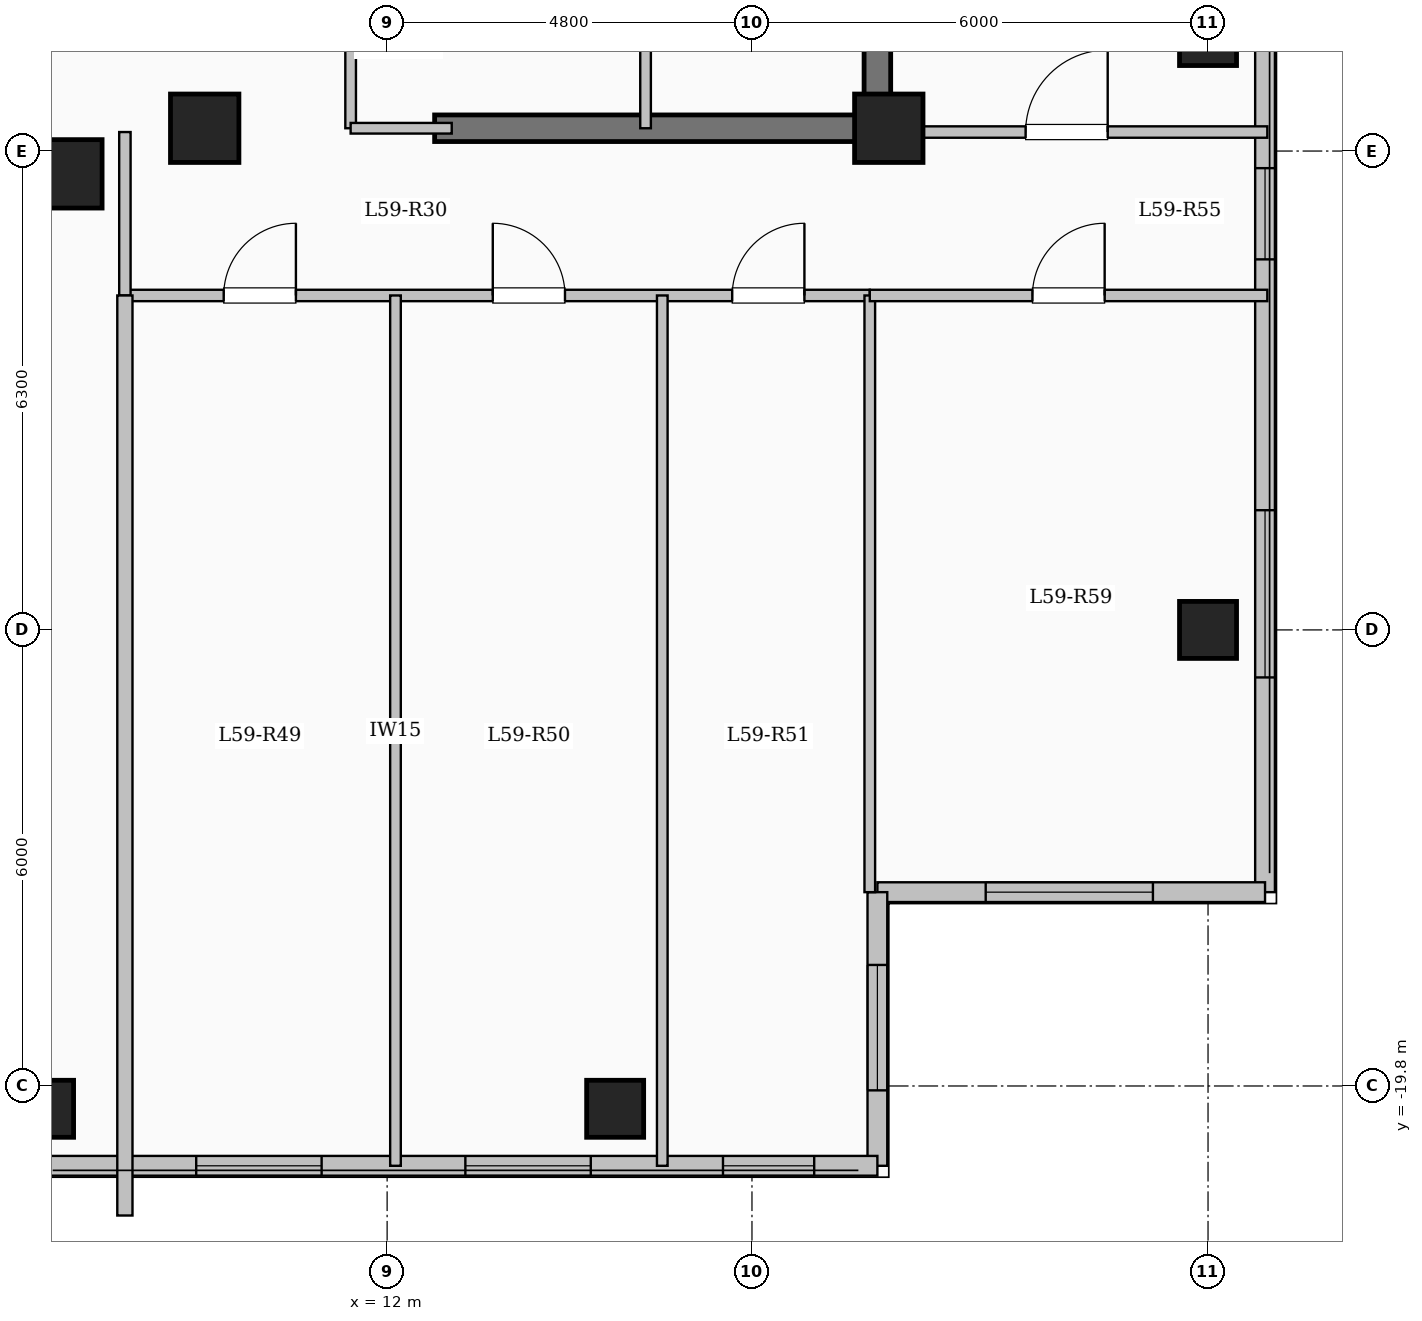
"""IFC4 building model, lengths in metres.
Left out: names, types, materials, properties, quantities, classifications, styles, units other than length and angle.
Written with IfcOpenShell. Run it as: python <this file> out.ifc"""

import sys

from ifc_helpers import new_model, si_unit, direction, frame, frame_2d, origin, origin_2d, place, context, subcontext, project, spatial, rectangle, extrude, element, fill, save


model = new_model("IFC4")
c1 = context("Model", 3, precision=1e-05, world=origin(), true_north=direction((0.0, 1.0)))
c2 = subcontext(c1, "Body", "Model", "MODEL_VIEW")
j1 = project(units=[si_unit("LENGTHUNIT", "METRE"), si_unit("PLANEANGLEUNIT", "RADIAN")], contexts=[c1])
p1 = place(None, origin())
s1 = spatial("IfcSite", under=j1, at=p1, CompositionType="ELEMENT")
p2 = place(p1, origin())
s2 = spatial("IfcBuilding", under=s1, at=p2, CompositionType="ELEMENT")
p3 = place(p2, frame((0.0, 0.0, 217.05)))
s3 = spatial("IfcBuildingStorey", under=s2, at=p3, CompositionType="ELEMENT", Elevation=217.05)
for number, where, z_axis, x_axis in (
    (1, (7.8, -7.8, 0.0), (0.0, 0.0, 1.0), (1.0, 0.0, 0.0)),
    (2, (9.6, -7.2, 0.0), (0.0, 0.0, 1.0), (1.0, 0.0, 0.0)),
    (3, (18.6, -7.2, 0.0), (0.0, 0.0, 1.0), (1.0, 0.0, 0.0)),
):
    element("IfcColumn", number, at=place(p3, frame(where, z_axis=z_axis, x_axis=x_axis)), inside=s3, PredefinedType="COLUMN", context=c2, shape_type="SweptSolid", body=[
        extrude(rectangle(XDim=0.9, YDim=0.9, at=origin_2d()), origin(), (0.0, 0.0, 1.0), 3.35),
    ])
for number, where, z_axis, x_axis in (
    (4, (7.5, -20.1, 0.0), (0.0, 0.0, 1.0), (1.0, 0.0, 0.0)),
    (5, (15.0, -20.1, 0.0), (0.0, 0.0, 1.0), (1.0, 0.0, 0.0)),
    (6, (22.8, -13.8, 0.0), (0.0, 0.0, 1.0), (1.0, 0.0, 0.0)),
    (7, (22.8, -6.0, 0.0), (0.0, 0.0, 1.0), (1.0, 0.0, 0.0)),
):
    element("IfcColumn", number, at=place(p3, frame(where, z_axis=z_axis, x_axis=x_axis)), inside=s3, PredefinedType="COLUMN", context=c2, shape_type="SweptSolid", body=[
        extrude(rectangle(XDim=0.75, YDim=0.75, at=origin_2d()), origin(), (0.0, 0.0, 1.0), 3.35),
    ])
p4 = place(p3, frame((23.55, 17.25, 0.0), z_axis=(0.0, 0.0, 1.0), x_axis=(0.0, -1.0, 0.0)))
e8 = element("IfcWall", 8, at=p4, inside=s3, PredefinedType="SOLIDWALL", context=c2, shape_type="SweptSolid", body=[
    extrude(rectangle(XDim=34.5, YDim=0.26, at=frame_2d((17.25, 0.0))), origin(), (0.0, 0.0, 1.0), 3.1),
])
p5 = place(p4, frame((1.375, 0.0, 0.9)))
e9 = element("IfcOpeningElement", 9, at=p5, cuts=e8, PredefinedType="OPENING", context=c2, shape_type="SweptSolid", body=[
    extrude(rectangle(XDim=2.0, YDim=1.7, at=frame_2d((1.0, 0.85))), frame((0.0, 0.14, 0.0), z_axis=(0.0, -1.0, 0.0), x_axis=(1.0, 0.0, 0.0)), (0.0, 0.0, 1.0), 0.28),
])
p6 = place(p4, frame((5.125, 0.0, 0.95)))
e10 = element("IfcOpeningElement", 10, at=p6, cuts=e8, PredefinedType="OPENING", context=c2, shape_type="SweptSolid", body=[
    extrude(rectangle(XDim=1.0, YDim=1.5, at=frame_2d((0.5, 0.75))), frame((0.0, 0.14, 0.0), z_axis=(0.0, -1.0, 0.0), x_axis=(1.0, 0.0, 0.0)), (0.0, 0.0, 1.0), 0.28),
])
p7 = place(p4, frame((14.5, 0.0, 0.9)))
e11 = element("IfcOpeningElement", 11, at=p7, cuts=e8, PredefinedType="OPENING", context=c2, shape_type="SweptSolid", body=[
    extrude(rectangle(XDim=2.0, YDim=1.7, at=frame_2d((1.0, 0.85))), frame((0.0, 0.14, 0.0), z_axis=(0.0, -1.0, 0.0), x_axis=(1.0, 0.0, 0.0)), (0.0, 0.0, 1.0), 0.28),
])
p8 = place(p4, frame((24.975, 0.0, 0.95)))
e12 = element("IfcOpeningElement", 12, at=p8, cuts=e8, PredefinedType="OPENING", context=c2, shape_type="SweptSolid", body=[
    extrude(rectangle(XDim=1.2, YDim=1.5, at=frame_2d((0.6, 0.75))), frame((0.0, 0.14, 0.0), z_axis=(0.0, -1.0, 0.0), x_axis=(1.0, 0.0, 0.0)), (0.0, 0.0, 1.0), 0.28),
])
p9 = place(p4, frame((29.475, 0.0, 0.9)))
e13 = element("IfcOpeningElement", 13, at=p9, cuts=e8, PredefinedType="OPENING", context=c2, shape_type="SweptSolid", body=[
    extrude(rectangle(XDim=2.2, YDim=1.75, at=frame_2d((1.1, 0.875))), frame((0.0, 0.14, 0.0), z_axis=(0.0, -1.0, 0.0), x_axis=(1.0, 0.0, 0.0)), (0.0, 0.0, 1.0), 0.28),
])
p10 = place(p3, frame((23.55, -17.25, 0.0), z_axis=(0.0, 0.0, 1.0), x_axis=(-1.0, 0.0, 0.0)))
e14 = element("IfcWall", 14, at=p10, inside=s3, PredefinedType="SOLIDWALL", context=c2, shape_type="SweptSolid", body=[
    extrude(rectangle(XDim=5.1, YDim=0.26, at=frame_2d((2.55, 0.0))), origin(), (0.0, 0.0, 1.0), 3.1),
])
p11 = place(p10, frame((1.475, 0.0, 0.9)))
e15 = element("IfcOpeningElement", 15, at=p11, cuts=e14, PredefinedType="OPENING", context=c2, shape_type="SweptSolid", body=[
    extrude(rectangle(XDim=2.2, YDim=1.75, at=frame_2d((1.1, 0.875))), frame((0.0, 0.14, 0.0), z_axis=(0.0, -1.0, 0.0), x_axis=(1.0, 0.0, 0.0)), (0.0, 0.0, 1.0), 0.28),
])
p12 = place(p3, frame((18.45, -17.25, 0.0), z_axis=(0.0, 0.0, 1.0), x_axis=(0.0, -1.0, 0.0)))
e16 = element("IfcWall", 16, at=p12, inside=s3, PredefinedType="SOLIDWALL", context=c2, shape_type="SweptSolid", body=[
    extrude(rectangle(XDim=3.6, YDim=0.26, at=frame_2d((1.8, 0.0))), origin(), (0.0, 0.0, 1.0), 3.1),
])
p13 = place(p12, frame((0.958, 0.0, 0.9)))
e17 = element("IfcOpeningElement", 17, at=p13, cuts=e16, PredefinedType="OPENING", context=c2, shape_type="SweptSolid", body=[
    extrude(rectangle(XDim=1.65, YDim=1.6, at=frame_2d((0.825, 0.8))), frame((0.0, 0.14, 0.0), z_axis=(0.0, -1.0, 0.0), x_axis=(1.0, 0.0, 0.0)), (0.0, 0.0, 1.0), 0.28),
])
p14 = place(p3, frame((18.45, -20.85, 0.0), z_axis=(0.0, 0.0, 1.0), x_axis=(-1.0, 0.0, 0.0)))
e18 = element("IfcWall", 18, at=p14, inside=s3, PredefinedType="SOLIDWALL", context=c2, shape_type="SweptSolid", body=[
    extrude(rectangle(XDim=11.1, YDim=0.26, at=frame_2d((5.55, 0.0))), origin(), (0.0, 0.0, 1.0), 3.1),
])
p15 = place(p14, frame((0.831, 0.0, 0.95)))
e19 = element("IfcOpeningElement", 19, at=p15, cuts=e18, PredefinedType="OPENING", context=c2, shape_type="SweptSolid", body=[
    extrude(rectangle(XDim=1.2, YDim=1.5, at=frame_2d((0.6, 0.75))), frame((0.0, 0.14, 0.0), z_axis=(0.0, -1.0, 0.0), x_axis=(1.0, 0.0, 0.0)), (0.0, 0.0, 1.0), 0.28),
])
p16 = place(p14, frame((3.771, 0.0, 0.9)))
e20 = element("IfcOpeningElement", 20, at=p16, cuts=e18, PredefinedType="OPENING", context=c2, shape_type="SweptSolid", body=[
    extrude(rectangle(XDim=1.65, YDim=1.6, at=frame_2d((0.825, 0.8))), frame((0.0, 0.14, 0.0), z_axis=(0.0, -1.0, 0.0), x_axis=(1.0, 0.0, 0.0)), (0.0, 0.0, 1.0), 0.28),
])
p17 = place(p14, frame((7.312, 0.0, 0.9)))
e21 = element("IfcOpeningElement", 21, at=p17, cuts=e18, PredefinedType="OPENING", context=c2, shape_type="SweptSolid", body=[
    extrude(rectangle(XDim=1.65, YDim=1.6, at=frame_2d((0.825, 0.8))), frame((0.0, 0.14, 0.0), z_axis=(0.0, -1.0, 0.0), x_axis=(1.0, 0.0, 0.0)), (0.0, 0.0, 1.0), 0.28),
])
p18 = place(p3, frame((18.45, -7.375, 0.0), z_axis=(0.0, 0.0, 1.0), x_axis=(0.0, 1.0, 0.0)))
e22 = element("IfcWall", 22, at=p18, inside=s3, PredefinedType="SHEAR", context=c2, shape_type="SweptSolid", body=[
    extrude(rectangle(XDim=14.05, YDim=0.35, at=frame_2d((7.025, 0.0))), origin(), (0.0, 0.0, 1.0), 3.35),
])
p19 = place(p3, frame((12.625, -7.2, 0.0), z_axis=(0.0, 0.0, 1.0), x_axis=(1.0, 0.0, 0.0)))
e23 = element("IfcWall", 23, at=p19, inside=s3, PredefinedType="SHEAR", context=c2, shape_type="SweptSolid", body=[
    extrude(rectangle(XDim=6.0, YDim=0.35, at=frame_2d((3.0, 0.0))), origin(), (0.0, 0.0, 1.0), 3.35),
])
p20 = place(p3, frame((15.4, -7.2, 0.0), z_axis=(0.0, 0.0, 1.0), x_axis=(0.0, 1.0, 0.0)))
e24 = element("IfcWall", 24, at=p20, inside=s3, PredefinedType="PARTITIONING", context=c2, shape_type="SweptSolid", body=[
    extrude(rectangle(XDim=10.45, YDim=0.14, at=frame_2d((5.225, 0.0))), origin(), (0.0, 0.0, 1.0), 3.1),
])
p21 = place(p20, frame((9.25, 0.0, 0.0)))
e25 = element("IfcOpeningElement", 25, at=p21, cuts=e24, PredefinedType="OPENING", context=c2, shape_type="SweptSolid", body=[
    extrude(rectangle(XDim=0.9, YDim=2.08, at=frame_2d((0.45, 1.04))), frame((0.0, 0.08, 0.0), z_axis=(0.0, -1.0, 0.0), x_axis=(1.0, 0.0, 0.0)), (0.0, 0.0, 1.0), 0.16),
])
p22 = place(p3, frame((11.52, -7.2, 0.0), z_axis=(0.0, 0.0, 1.0), x_axis=(0.0, 1.0, 0.0)))
e26 = element("IfcWall", 26, at=p22, inside=s3, PredefinedType="PARTITIONING", context=c2, shape_type="SweptSolid", body=[
    extrude(rectangle(XDim=9.12, YDim=0.14, at=frame_2d((4.56, 0.0))), origin(), (0.0, 0.0, 1.0), 3.1),
])
p23 = place(p22, frame((1.8, 0.0, 0.0)))
e27 = element("IfcOpeningElement", 27, at=p23, cuts=e26, PredefinedType="OPENING", context=c2, shape_type="SweptSolid", body=[
    extrude(rectangle(XDim=0.9, YDim=2.08, at=frame_2d((0.45, 1.04))), frame((0.0, 0.08, 0.0), z_axis=(0.0, -1.0, 0.0), x_axis=(1.0, 0.0, 0.0)), (0.0, 0.0, 1.0), 0.16),
])
p24 = place(p22, frame((6.2, 0.0, 0.0)))
e28 = element("IfcOpeningElement", 28, at=p24, cuts=e26, PredefinedType="OPENING", context=c2, shape_type="SweptSolid", body=[
    extrude(rectangle(XDim=0.9, YDim=2.08, at=frame_2d((0.45, 1.04))), frame((0.0, 0.08, 0.0), z_axis=(0.0, -1.0, 0.0), x_axis=(1.0, 0.0, 0.0)), (0.0, 0.0, 1.0), 0.16),
])
p25 = place(p3, frame((11.52, -7.2, 0.0), z_axis=(0.0, 0.0, 1.0), x_axis=(1.0, 0.0, 0.0)))
e29 = element("IfcWall", 29, at=p25, inside=s3, PredefinedType="PARTITIONING", context=c2, shape_type="SweptSolid", body=[
    extrude(rectangle(XDim=1.33, YDim=0.14, at=frame_2d((0.665, 0.0))), origin(), (0.0, 0.0, 1.0), 2.235),
])
p26 = place(p3, frame((8.55, -9.4, 0.0), z_axis=(0.0, 0.0, 1.0), x_axis=(1.0, 0.0, 0.0)))
e30 = element("IfcWall", 30, at=p26, inside=s3, PredefinedType="PARTITIONING", context=c2, shape_type="SweptSolid", body=[
    extrude(rectangle(XDim=9.8, YDim=0.15, at=frame_2d((4.9, 0.0))), origin(), (0.0, 0.0, 1.0), 3.1),
])
p27 = place(p26, frame((1.3, 0.0, 0.0)))
e31 = element("IfcOpeningElement", 31, at=p27, cuts=e30, PredefinedType="OPENING", context=c2, shape_type="SweptSolid", body=[
    extrude(rectangle(XDim=0.95, YDim=2.15, at=frame_2d((0.475, 1.075))), frame((0.0, 0.085, 0.0), z_axis=(0.0, -1.0, 0.0), x_axis=(1.0, 0.0, 0.0)), (0.0, 0.0, 1.0), 0.17),
])
p28 = place(p26, frame((4.84, 0.0, 0.0)))
e32 = element("IfcOpeningElement", 32, at=p28, cuts=e30, PredefinedType="OPENING", context=c2, shape_type="SweptSolid", body=[
    extrude(rectangle(XDim=0.95, YDim=2.15, at=frame_2d((0.475, 1.075))), frame((0.0, 0.085, 0.0), z_axis=(0.0, -1.0, 0.0), x_axis=(1.0, 0.0, 0.0)), (0.0, 0.0, 1.0), 0.17),
])
p29 = place(p26, frame((7.99, 0.0, 0.0)))
e33 = element("IfcOpeningElement", 33, at=p29, cuts=e30, PredefinedType="OPENING", context=c2, shape_type="SweptSolid", body=[
    extrude(rectangle(XDim=0.95, YDim=2.15, at=frame_2d((0.475, 1.075))), frame((0.0, 0.085, 0.0), z_axis=(0.0, -1.0, 0.0), x_axis=(1.0, 0.0, 0.0)), (0.0, 0.0, 1.0), 0.17),
])
p30 = place(p3, frame((8.55, -9.4, 0.0), z_axis=(0.0, 0.0, 1.0), x_axis=(0.0, 1.0, 0.0)))
e34 = element("IfcWall", 34, at=p30, inside=s3, PredefinedType="PARTITIONING", context=c2, shape_type="SweptSolid", body=[
    extrude(rectangle(XDim=2.15, YDim=0.15, at=frame_2d((1.075, 0.0))), origin(), (0.0, 0.0, 1.0), 3.1),
])
for number, where, z_axis, x_axis in (
    (35, (12.11, -20.85, 0.0), (0.0, 0.0, 1.0), (0.0, 1.0, 0.0)),
    (36, (15.62, -20.85, 0.0), (0.0, 0.0, 1.0), (0.0, 1.0, 0.0)),
):
    element("IfcWall", number, at=place(p3, frame(where, z_axis=z_axis, x_axis=x_axis)), inside=s3, PredefinedType="PARTITIONING", context=c2, shape_type="SweptSolid", body=[
        extrude(rectangle(XDim=11.45, YDim=0.14, at=frame_2d((5.725, 0.0))), origin(), (0.0, 0.0, 1.0), 3.1),
    ])
p31 = place(p3, frame((8.55, -21.504, 0.0), z_axis=(0.0, 0.0, 1.0), x_axis=(0.0, 1.0, 0.0)))
e37 = element("IfcWall", 37, at=p31, inside=s3, PredefinedType="SOLIDWALL", context=c2, shape_type="SweptSolid", body=[
    extrude(rectangle(XDim=12.104, YDim=0.2, at=frame_2d((6.052, 0.0))), origin(), (0.0, 0.0, 1.0), 3.1),
])
p32 = place(p3, frame((18.45, -7.25, 0.0), z_axis=(0.0, 0.0, 1.0), x_axis=(1.0, 0.0, 0.0)))
e38 = element("IfcWall", 38, at=p32, inside=s3, PredefinedType="PARTITIONING", context=c2, shape_type="SweptSolid", body=[
    extrude(rectangle(XDim=5.13, YDim=0.15, at=frame_2d((2.565, 0.0))), origin(), (0.0, 0.0, 1.0), 3.1),
])
p33 = place(p32, frame((1.95, 0.0, 0.0)))
e39 = element("IfcOpeningElement", 39, at=p33, cuts=e38, PredefinedType="OPENING", context=c2, shape_type="SweptSolid", body=[
    extrude(rectangle(XDim=1.08, YDim=2.15, at=frame_2d((0.54, 1.075))), frame((0.0, 0.085, 0.0), z_axis=(0.0, -1.0, 0.0), x_axis=(1.0, 0.0, 0.0)), (0.0, 0.0, 1.0), 0.17),
])
p34 = place(p3, frame((18.35, -17.25, 0.0), z_axis=(0.0, 0.0, 1.0), x_axis=(0.0, 1.0, 0.0)))
e40 = element("IfcWall", 40, at=p34, inside=s3, PredefinedType="PARTITIONING", context=c2, shape_type="SweptSolid", body=[
    extrude(rectangle(XDim=7.85, YDim=0.14, at=frame_2d((3.925, 0.0))), origin(), (0.0, 0.0, 1.0), 3.1),
])
p35 = place(p3, frame((18.35, -9.4, 0.0), z_axis=(0.0, 0.0, 1.0), x_axis=(1.0, 0.0, 0.0)))
e41 = element("IfcWall", 41, at=p35, inside=s3, PredefinedType="PARTITIONING", context=c2, shape_type="SweptSolid", body=[
    extrude(rectangle(XDim=5.23, YDim=0.15, at=frame_2d((2.615, 0.0))), origin(), (0.0, 0.0, 1.0), 3.1),
])
p36 = place(p35, frame((2.14, 0.0, 0.0)))
e42 = element("IfcOpeningElement", 42, at=p36, cuts=e41, PredefinedType="OPENING", context=c2, shape_type="SweptSolid", body=[
    extrude(rectangle(XDim=0.95, YDim=2.15, at=frame_2d((0.475, 1.075))), frame((0.0, 0.085, 0.0), z_axis=(0.0, -1.0, 0.0), x_axis=(1.0, 0.0, 0.0)), (0.0, 0.0, 1.0), 0.17),
])
p37 = place(p8, origin())
e43 = element("IfcWindow", 43, at=p37, inside=s3, PartitioningType="SINGLE_PANEL", PredefinedType="WINDOW", context=c2, shape_type="SweptSolid", body=[
    extrude(rectangle(XDim=1.2, YDim=1.5, at=frame_2d((0.6, 0.75))), frame((0.0, 0.03, 0.0), z_axis=(0.0, -1.0, 0.0), x_axis=(1.0, 0.0, 0.0)), (0.0, 0.0, 1.0), 0.06),
])
fill(e12, e43)
p38 = place(p9, origin())
e44 = element("IfcWindow", 44, at=p38, inside=s3, PartitioningType="SINGLE_PANEL", PredefinedType="WINDOW", context=c2, shape_type="SweptSolid", body=[
    extrude(rectangle(XDim=2.2, YDim=1.75, at=frame_2d((1.1, 0.875))), frame((0.0, 0.03, 0.0), z_axis=(0.0, -1.0, 0.0), x_axis=(1.0, 0.0, 0.0)), (0.0, 0.0, 1.0), 0.06),
])
fill(e13, e44)
p39 = place(p11, origin())
e45 = element("IfcWindow", 45, at=p39, inside=s3, PartitioningType="SINGLE_PANEL", PredefinedType="WINDOW", context=c2, shape_type="SweptSolid", body=[
    extrude(rectangle(XDim=2.2, YDim=1.75, at=frame_2d((1.1, 0.875))), frame((0.0, 0.03, 0.0), z_axis=(0.0, -1.0, 0.0), x_axis=(1.0, 0.0, 0.0)), (0.0, 0.0, 1.0), 0.06),
])
fill(e15, e45)
p40 = place(p13, origin())
e46 = element("IfcWindow", 46, at=p40, inside=s3, PartitioningType="SINGLE_PANEL", PredefinedType="WINDOW", context=c2, shape_type="SweptSolid", body=[
    extrude(rectangle(XDim=1.65, YDim=1.6, at=frame_2d((0.825, 0.8))), frame((0.0, 0.03, 0.0), z_axis=(0.0, -1.0, 0.0), x_axis=(1.0, 0.0, 0.0)), (0.0, 0.0, 1.0), 0.06),
])
fill(e17, e46)
p41 = place(p15, origin())
e47 = element("IfcWindow", 47, at=p41, inside=s3, PartitioningType="SINGLE_PANEL", PredefinedType="WINDOW", context=c2, shape_type="SweptSolid", body=[
    extrude(rectangle(XDim=1.2, YDim=1.5, at=frame_2d((0.6, 0.75))), frame((0.0, 0.03, 0.0), z_axis=(0.0, -1.0, 0.0), x_axis=(1.0, 0.0, 0.0)), (0.0, 0.0, 1.0), 0.06),
])
fill(e19, e47)
p42 = place(p16, origin())
e48 = element("IfcWindow", 48, at=p42, inside=s3, PartitioningType="SINGLE_PANEL", PredefinedType="WINDOW", context=c2, shape_type="SweptSolid", body=[
    extrude(rectangle(XDim=1.65, YDim=1.6, at=frame_2d((0.825, 0.8))), frame((0.0, 0.03, 0.0), z_axis=(0.0, -1.0, 0.0), x_axis=(1.0, 0.0, 0.0)), (0.0, 0.0, 1.0), 0.06),
])
fill(e20, e48)
p43 = place(p17, origin())
e49 = element("IfcWindow", 49, at=p43, inside=s3, PartitioningType="SINGLE_PANEL", PredefinedType="WINDOW", context=c2, shape_type="SweptSolid", body=[
    extrude(rectangle(XDim=1.65, YDim=1.6, at=frame_2d((0.825, 0.8))), frame((0.0, 0.03, 0.0), z_axis=(0.0, -1.0, 0.0), x_axis=(1.0, 0.0, 0.0)), (0.0, 0.0, 1.0), 0.06),
])
fill(e21, e49)
p44 = place(p27, origin())
e50 = element("IfcDoor", 50, at=p44, inside=s3, OperationType="SINGLE_SWING_RIGHT", PredefinedType="DOOR", context=c2, shape_type="SweptSolid", body=[
    extrude(rectangle(XDim=0.95, YDim=2.15, at=frame_2d((0.475, 1.075))), frame((0.0, 0.025, 0.0), z_axis=(0.0, -1.0, 0.0), x_axis=(1.0, 0.0, 0.0)), (0.0, 0.0, 1.0), 0.05),
])
fill(e31, e50)
p45 = place(p28, origin())
e51 = element("IfcDoor", 51, at=p45, inside=s3, OperationType="SINGLE_SWING_LEFT", PredefinedType="DOOR", context=c2, shape_type="SweptSolid", body=[
    extrude(rectangle(XDim=0.95, YDim=2.15, at=frame_2d((0.475, 1.075))), frame((0.0, 0.025, 0.0), z_axis=(0.0, -1.0, 0.0), x_axis=(1.0, 0.0, 0.0)), (0.0, 0.0, 1.0), 0.05),
])
fill(e32, e51)
p46 = place(p29, origin())
e52 = element("IfcDoor", 52, at=p46, inside=s3, OperationType="SINGLE_SWING_RIGHT", PredefinedType="DOOR", context=c2, shape_type="SweptSolid", body=[
    extrude(rectangle(XDim=0.95, YDim=2.15, at=frame_2d((0.475, 1.075))), frame((0.0, 0.025, 0.0), z_axis=(0.0, -1.0, 0.0), x_axis=(1.0, 0.0, 0.0)), (0.0, 0.0, 1.0), 0.05),
])
fill(e33, e52)
p47 = place(p36, origin())
e53 = element("IfcDoor", 53, at=p47, inside=s3, OperationType="SINGLE_SWING_RIGHT", PredefinedType="DOOR", context=c2, shape_type="SweptSolid", body=[
    extrude(rectangle(XDim=0.95, YDim=2.15, at=frame_2d((0.475, 1.075))), frame((0.0, 0.025, 0.0), z_axis=(0.0, -1.0, 0.0), x_axis=(1.0, 0.0, 0.0)), (0.0, 0.0, 1.0), 0.05),
])
fill(e42, e53)
p48 = place(p33, origin())
e54 = element("IfcDoor", 54, at=p48, inside=s3, OperationType="SINGLE_SWING_RIGHT", PredefinedType="DOOR", context=c2, shape_type="SweptSolid", body=[
    extrude(rectangle(XDim=1.08, YDim=2.15, at=frame_2d((0.54, 1.075))), frame((0.0, 0.025, 0.0), z_axis=(0.0, -1.0, 0.0), x_axis=(1.0, 0.0, 0.0)), (0.0, 0.0, 1.0), 0.05),
])
fill(e39, e54)
save(model, sys.argv[1])
